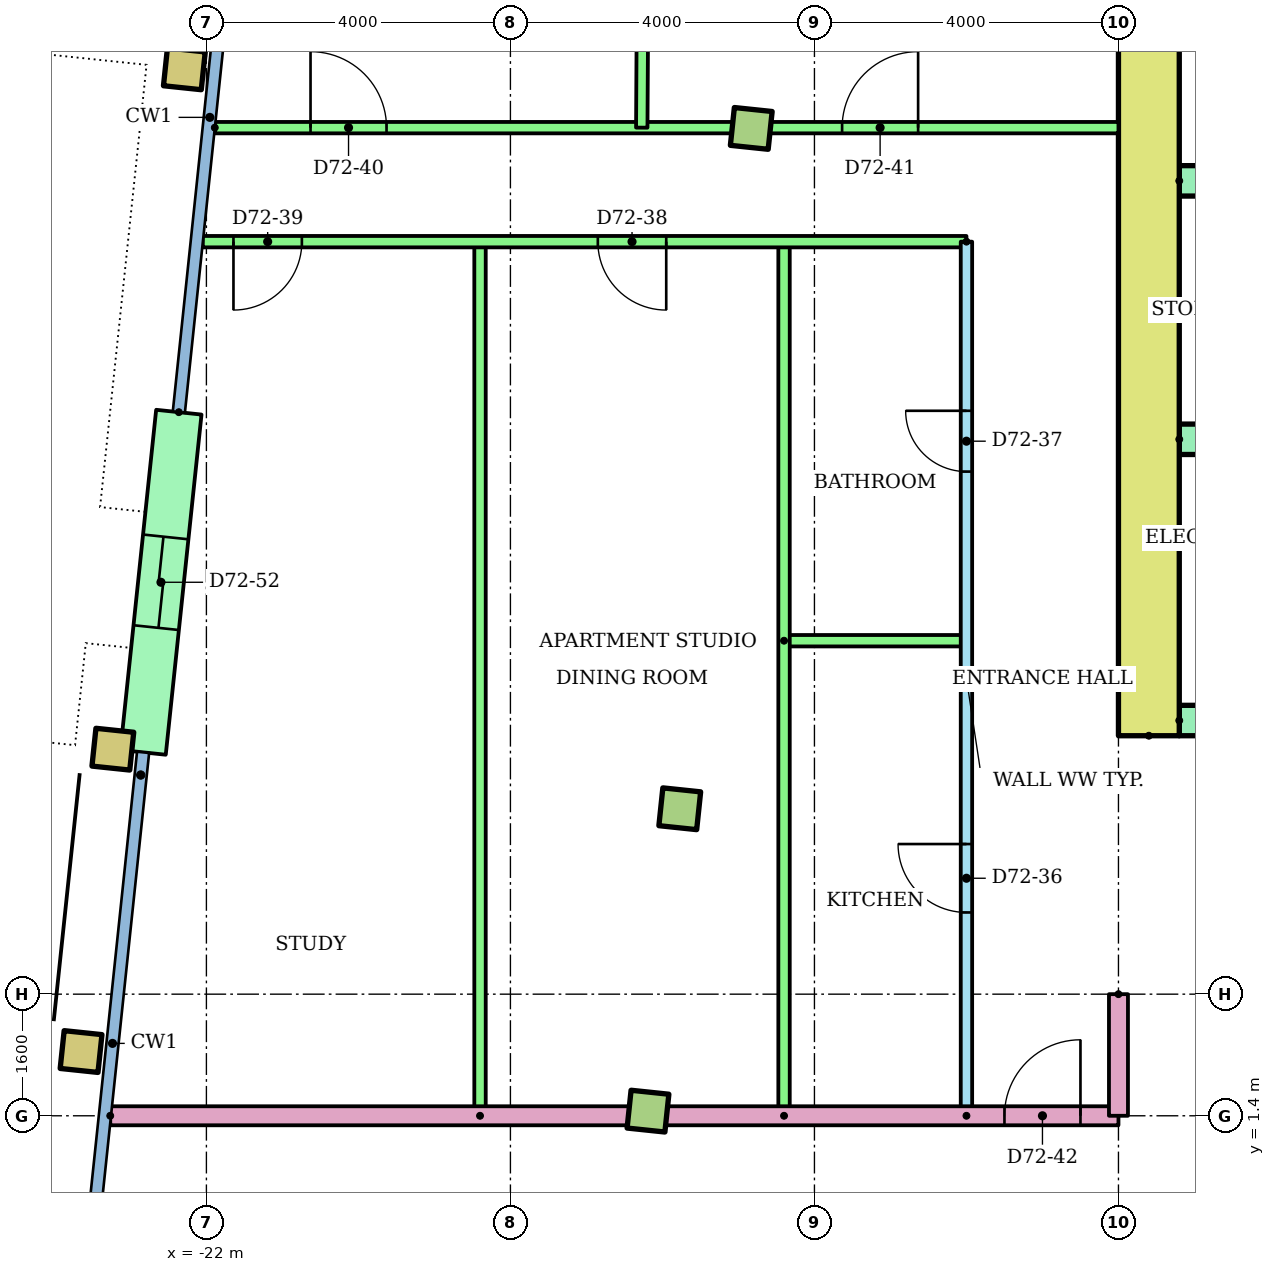
"""IFC4 building model, lengths in metres.
Left out: names, types, materials, properties, quantities, classifications, styles, units other than length and angle.
Written with IfcOpenShell. Run it as: python <this file> out.ifc"""

import sys

from ifc_helpers import new_model, si_unit, direction, frame, frame_2d, origin, origin_2d, place, context, subcontext, project, spatial, rectangle, hollow_rectangle, extrude, element, fill, save


model = new_model("IFC4")
c1 = context("Model", 3, precision=1e-05, world=origin(), true_north=direction((0.0, 1.0)))
c2 = subcontext(c1, "Body", "Model", "MODEL_VIEW")
j1 = project(units=[si_unit("LENGTHUNIT", "METRE"), si_unit("PLANEANGLEUNIT", "RADIAN")], contexts=[c1])
p1 = place(None, origin())
s1 = spatial("IfcSite", under=j1, at=p1, CompositionType="ELEMENT")
p2 = place(p1, origin())
s2 = spatial("IfcBuilding", under=s1, at=p2, CompositionType="ELEMENT")
p3 = place(p2, frame((0.0, 0.0, 275.5)))
s3 = spatial("IfcBuildingStorey", under=s2, at=p3, CompositionType="ELEMENT", Elevation=275.5)
p4 = place(p3, frame((-23.649, 2.245, 0.0), z_axis=(0.0, 0.0, 1.0), x_axis=(0.994521895368, -0.104528463268, 0.0)))
e1 = element("IfcColumn", 1, at=p4, inside=s3, PredefinedType="COLUMN", context=c2, shape_type="SweptSolid", body=[
    extrude(hollow_rectangle(XDim=0.5, YDim=0.5, WallThickness=0.025, at=origin_2d()), origin(), (0.0, 0.0, 1.0), 3.2),
])
p5 = place(p3, frame((-16.19, 1.461, 0.0), z_axis=(0.0, 0.0, 1.0), x_axis=(0.994521895368, -0.104528463268, 0.0)))
e2 = element("IfcColumn", 2, at=p5, inside=s3, PredefinedType="COLUMN", context=c2, shape_type="SweptSolid", body=[
    extrude(rectangle(XDim=0.5, YDim=0.5, at=origin_2d()), origin(), (0.0, 0.0, 1.0), 3.2),
])
p6 = place(p3, frame((-23.231, 6.223, 0.0), z_axis=(0.0, 0.0, 1.0), x_axis=(0.994521895368, -0.104528463268, 0.0)))
e3 = element("IfcColumn", 3, at=p6, inside=s3, PredefinedType="COLUMN", context=c2, shape_type="SweptSolid", body=[
    extrude(hollow_rectangle(XDim=0.5, YDim=0.5, WallThickness=0.025, at=origin_2d()), origin(), (0.0, 0.0, 1.0), 3.2),
])
p7 = place(p3, frame((-15.772, 5.439, 0.0), z_axis=(0.0, 0.0, 1.0), x_axis=(0.994521895368, -0.104528463268, 0.0)))
e4 = element("IfcColumn", 4, at=p7, inside=s3, PredefinedType="COLUMN", context=c2, shape_type="SweptSolid", body=[
    extrude(rectangle(XDim=0.5, YDim=0.5, at=origin_2d()), origin(), (0.0, 0.0, 1.0), 3.2),
])
p8 = place(p3, frame((-22.29, 15.174, 0.0), z_axis=(0.0, 0.0, 1.0), x_axis=(0.994521895368, -0.104528463268, 0.0)))
e5 = element("IfcColumn", 5, at=p8, inside=s3, PredefinedType="COLUMN", context=c2, shape_type="SweptSolid", body=[
    extrude(hollow_rectangle(XDim=0.5, YDim=0.5, WallThickness=0.025, at=origin_2d()), origin(), (0.0, 0.0, 1.0), 3.2),
])
p9 = place(p3, frame((-14.831, 14.39, 0.0), z_axis=(0.0, 0.0, 1.0), x_axis=(0.994521895368, -0.104528463268, 0.0)))
e6 = element("IfcColumn", 6, at=p9, inside=s3, PredefinedType="COLUMN", context=c2, shape_type="SweptSolid", body=[
    extrude(rectangle(XDim=0.5, YDim=0.5, at=origin_2d()), origin(), (0.0, 0.0, 1.0), 3.2),
])
p10 = place(p3, frame((-22.363, 10.657, 0.0), z_axis=(0.0, 0.0, 1.0), x_axis=(-0.104492739125, -0.994525649478, 0.0)))
e7 = element("IfcWall", 7, at=p10, inside=s3, PredefinedType="STANDARD", context=c2, shape_type="SweptSolid", body=[
    extrude(rectangle(XDim=4.5, YDim=0.6, at=frame_2d((2.25, 0.0))), origin(), (0.0, 0.0, 1.0), 2.92),
])
p11 = place(p10, frame((1.65, 0.0, 0.0)))
e8 = element("IfcOpeningElement", 8, at=p11, cuts=e7, PredefinedType="OPENING", context=c2, shape_type="SweptSolid", body=[
    extrude(rectangle(XDim=1.2, YDim=2.1, at=frame_2d((0.6, 1.05))), frame((0.0, 0.31, 0.0), z_axis=(0.0, -1.0, 0.0), x_axis=(1.0, 0.0, 0.0)), (0.0, 0.0, 1.0), 0.62),
])
p12 = place(p3, frame((-9.6, 6.4, 0.0), z_axis=(0.0, 0.0, 1.0), x_axis=(0.0, 1.0, 0.0)))
e9 = element("IfcWall", 9, at=p12, inside=s3, PredefinedType="SHEAR", context=c2, shape_type="SweptSolid", body=[
    extrude(rectangle(XDim=13.6, YDim=0.8, at=frame_2d((6.8, 0.0))), origin(), (0.0, 0.0, 1.0), 2.92),
])
p13 = place(p3, frame((-9.2, 6.6, 0.0)))
e10 = element("IfcWall", 10, at=p13, inside=s3, PredefinedType="SHEAR", context=c2, shape_type="SweptSolid", body=[
    extrude(rectangle(XDim=18.4, YDim=0.4, at=frame_2d((9.2, 0.0))), origin(), (0.0, 0.0, 1.0), 2.92),
])
p14 = place(p13, frame((8.3, 0.0, 0.0)))
e11 = element("IfcOpeningElement", 11, at=p14, cuts=e10, PredefinedType="OPENING", context=c2, shape_type="SweptSolid", body=[
    extrude(rectangle(XDim=1.8, YDim=2.1, at=frame_2d((0.9, 1.05))), frame((0.0, 0.21, 0.0), z_axis=(0.0, -1.0, 0.0), x_axis=(1.0, 0.0, 0.0)), (0.0, 0.0, 1.0), 0.42),
])
p15 = place(p13, frame((3.8, 0.0, 0.0)))
e12 = element("IfcOpeningElement", 12, at=p15, cuts=e10, PredefinedType="OPENING", context=c2, shape_type="SweptSolid", body=[
    extrude(rectangle(XDim=1.8, YDim=2.1, at=frame_2d((0.9, 1.05))), frame((0.0, 0.21, 0.0), z_axis=(0.0, -1.0, 0.0), x_axis=(1.0, 0.0, 0.0)), (0.0, 0.0, 1.0), 0.42),
])
p16 = place(p13, frame((12.8, 0.0, 0.0)))
e13 = element("IfcOpeningElement", 13, at=p16, cuts=e10, PredefinedType="OPENING", context=c2, shape_type="SweptSolid", body=[
    extrude(rectangle(XDim=1.8, YDim=2.1, at=frame_2d((0.9, 1.05))), frame((0.0, 0.21, 0.0), z_axis=(0.0, -1.0, 0.0), x_axis=(1.0, 0.0, 0.0)), (0.0, 0.0, 1.0), 0.42),
])
p17 = place(p3, frame((-9.2, 10.3, 0.0)))
e14 = element("IfcWall", 14, at=p17, inside=s3, PredefinedType="SHEAR", context=c2, shape_type="SweptSolid", body=[
    extrude(rectangle(XDim=8.0, YDim=0.4, at=frame_2d((4.0, 0.0))), origin(), (0.0, 0.0, 1.0), 2.92),
])
p18 = place(p17, frame((3.35, 0.0, 0.0)))
e15 = element("IfcOpeningElement", 15, at=p18, cuts=e14, PredefinedType="OPENING", context=c2, shape_type="SweptSolid", body=[
    extrude(rectangle(XDim=1.1, YDim=2.1, at=frame_2d((0.55, 1.05))), frame((0.0, 0.21, 0.0), z_axis=(0.0, -1.0, 0.0), x_axis=(1.0, 0.0, 0.0)), (0.0, 0.0, 1.0), 0.42),
])
p19 = place(p17, frame((6.083, 0.0, 0.0)))
e16 = element("IfcOpeningElement", 16, at=p19, cuts=e14, PredefinedType="OPENING", context=c2, shape_type="SweptSolid", body=[
    extrude(rectangle(XDim=1.1, YDim=2.1, at=frame_2d((0.55, 1.05))), frame((0.0, 0.21, 0.0), z_axis=(0.0, -1.0, 0.0), x_axis=(1.0, 0.0, 0.0)), (0.0, 0.0, 1.0), 0.42),
])
p20 = place(p17, frame((0.917, 0.0, 0.0)))
e17 = element("IfcOpeningElement", 17, at=p20, cuts=e14, PredefinedType="OPENING", context=c2, shape_type="SweptSolid", body=[
    extrude(rectangle(XDim=1.0, YDim=2.1, at=frame_2d((0.5, 1.05))), frame((0.0, 0.21, 0.0), z_axis=(0.0, -1.0, 0.0), x_axis=(1.0, 0.0, 0.0)), (0.0, 0.0, 1.0), 0.42),
])
p21 = place(p3, frame((-9.2, 13.7, 0.0)))
e18 = element("IfcWall", 18, at=p21, inside=s3, PredefinedType="SHEAR", context=c2, shape_type="SweptSolid", body=[
    extrude(rectangle(XDim=8.0, YDim=0.4, at=frame_2d((4.0, 0.0))), origin(), (0.0, 0.0, 1.0), 2.92),
])
p22 = place(p3, frame((-12.0, 1.4, 0.0), z_axis=(0.0, 0.0, 1.0), x_axis=(0.0, 1.0, 0.0)))
e19 = element("IfcWall", 19, at=p22, inside=s3, PredefinedType="PARTITIONING", context=c2, shape_type="SweptSolid", body=[
    extrude(rectangle(XDim=11.5, YDim=0.15, at=frame_2d((5.75, 0.0))), origin(), (0.0, 0.0, 1.0), 2.4),
])
p23 = place(p22, frame((2.675, 0.0, 0.0)))
e20 = element("IfcOpeningElement", 20, at=p23, cuts=e19, PredefinedType="OPENING", context=c2, shape_type="SweptSolid", body=[
    extrude(rectangle(XDim=0.9, YDim=2.1, at=frame_2d((0.45, 1.05))), frame((0.0, 0.085, 0.0), z_axis=(0.0, -1.0, 0.0), x_axis=(1.0, 0.0, 0.0)), (0.0, 0.0, 1.0), 0.17),
])
p24 = place(p22, frame((8.475, 0.0, 0.0)))
e21 = element("IfcOpeningElement", 21, at=p24, cuts=e19, PredefinedType="OPENING", context=c2, shape_type="SweptSolid", body=[
    extrude(rectangle(XDim=0.8, YDim=2.1, at=frame_2d((0.4, 1.05))), frame((0.0, 0.085, 0.0), z_axis=(0.0, -1.0, 0.0), x_axis=(1.0, 0.0, 0.0)), (0.0, 0.0, 1.0), 0.17),
])
p25 = place(p3, frame((-14.4, 7.65, 0.0)))
e22 = element("IfcWall", 22, at=p25, inside=s3, PredefinedType="PARTITIONING", context=c2, shape_type="SweptSolid", body=[
    extrude(rectangle(XDim=2.4, YDim=0.15, at=frame_2d((1.2, 0.0))), origin(), (0.0, 0.0, 1.0), 2.4),
])
for number, where, z_axis, x_axis in (
    (23, (-14.4, 1.4, 0.0), (0.0, 0.0, 1.0), (0.0, 1.0, 0.0)),
    (24, (-18.4, 1.4, 0.0), (0.0, 0.0, 1.0), (0.0, 1.0, 0.0)),
):
    element("IfcWall", number, at=place(p3, frame(where, z_axis=z_axis, x_axis=x_axis)), inside=s3, PredefinedType="PARTITIONING", context=c2, shape_type="SweptSolid", body=[
        extrude(rectangle(XDim=11.5, YDim=0.15, at=frame_2d((5.75, 0.0))), origin(), (0.0, 0.0, 1.0), 2.4),
    ])
p26 = place(p3, frame((-12.0, 12.9, 0.0), z_axis=(0.0, 0.0, 1.0), x_axis=(-1.0, 0.0, 0.0)))
e25 = element("IfcWall", 25, at=p26, inside=s3, PredefinedType="PARTITIONING", context=c2, shape_type="SweptSolid", body=[
    extrude(rectangle(XDim=10.047, YDim=0.15, at=frame_2d((5.024, 0.0))), origin(), (0.0, 0.0, 1.0), 2.4),
])
p27 = place(p26, frame((3.95, 0.0, 0.0)))
e26 = element("IfcOpeningElement", 26, at=p27, cuts=e25, PredefinedType="OPENING", context=c2, shape_type="SweptSolid", body=[
    extrude(rectangle(XDim=0.9, YDim=2.1, at=frame_2d((0.45, 1.05))), frame((0.0, 0.085, 0.0), z_axis=(0.0, -1.0, 0.0), x_axis=(1.0, 0.0, 0.0)), (0.0, 0.0, 1.0), 0.17),
])
p28 = place(p26, frame((8.744, 0.0, 0.0)))
e27 = element("IfcOpeningElement", 27, at=p28, cuts=e25, PredefinedType="OPENING", context=c2, shape_type="SweptSolid", body=[
    extrude(rectangle(XDim=0.9, YDim=2.1, at=frame_2d((0.45, 1.05))), frame((0.0, 0.085, 0.0), z_axis=(0.0, -1.0, 0.0), x_axis=(1.0, 0.0, 0.0)), (0.0, 0.0, 1.0), 0.17),
])
p29 = place(p3, frame((-21.89, 14.4, 0.0)))
e28 = element("IfcWall", 28, at=p29, inside=s3, PredefinedType="PARTITIONING", context=c2, shape_type="SweptSolid", body=[
    extrude(rectangle(XDim=11.89, YDim=0.15, at=frame_2d((5.945, 0.0))), origin(), (0.0, 0.0, 1.0), 2.4),
])
p30 = place(p29, frame((1.26, 0.0, 0.0)))
e29 = element("IfcOpeningElement", 29, at=p30, cuts=e28, PredefinedType="OPENING", context=c2, shape_type="SweptSolid", body=[
    extrude(rectangle(XDim=1.0, YDim=2.1, at=frame_2d((0.5, 1.05))), frame((0.0, 0.085, 0.0), z_axis=(0.0, -1.0, 0.0), x_axis=(1.0, 0.0, 0.0)), (0.0, 0.0, 1.0), 0.17),
])
p31 = place(p29, frame((8.254, 0.0, 0.0)))
e30 = element("IfcOpeningElement", 30, at=p31, cuts=e28, PredefinedType="OPENING", context=c2, shape_type="SweptSolid", body=[
    extrude(rectangle(XDim=1.0, YDim=2.1, at=frame_2d((0.5, 1.05))), frame((0.0, 0.085, 0.0), z_axis=(0.0, -1.0, 0.0), x_axis=(1.0, 0.0, 0.0)), (0.0, 0.0, 1.0), 0.17),
])
p32 = place(p3, frame((-16.222, 22.61, 0.0), z_axis=(0.0, 0.0, 1.0), x_axis=(-0.006095634594, -0.999981421447, 0.0)))
e31 = element("IfcWall", 31, at=p32, inside=s3, PredefinedType="PARTITIONING", context=c2, shape_type="SweptSolid", body=[
    extrude(rectangle(XDim=8.211, YDim=0.15, at=frame_2d((4.105, 0.0))), origin(), (0.0, 0.0, 1.0), 2.4),
])
p33 = place(p3, frame((-23.265, 1.4, 0.0)))
e32 = element("IfcWall", 32, at=p33, inside=s3, PredefinedType="PARTITIONING", context=c2, shape_type="SweptSolid", body=[
    extrude(rectangle(XDim=13.265, YDim=0.25, at=frame_2d((6.633, 0.0))), origin(), (0.0, 0.0, 1.0), 2.4),
])
p34 = place(p33, frame((11.765, 0.0, 0.0)))
e33 = element("IfcOpeningElement", 33, at=p34, cuts=e32, PredefinedType="OPENING", context=c2, shape_type="SweptSolid", body=[
    extrude(rectangle(XDim=1.0, YDim=2.1, at=frame_2d((0.5, 1.05))), frame((0.0, 0.135, 0.0), z_axis=(0.0, -1.0, 0.0), x_axis=(1.0, 0.0, 0.0)), (0.0, 0.0, 1.0), 0.27),
])
p35 = place(p3, frame((-10.0, 3.0, 0.0), z_axis=(0.0, 0.0, 1.0), x_axis=(0.0, -1.0, 0.0)))
e34 = element("IfcWall", 34, at=p35, inside=s3, PredefinedType="PARTITIONING", context=c2, shape_type="SweptSolid", body=[
    extrude(rectangle(XDim=1.6, YDim=0.25, at=frame_2d((0.8, 0.0))), origin(), (0.0, 0.0, 1.0), 2.4),
])
p36 = place(p23, origin())
e35 = element("IfcDoor", 35, at=p36, inside=s3, OperationType="SINGLE_SWING_RIGHT", PredefinedType="DOOR", context=c2, shape_type="SweptSolid", body=[
    extrude(rectangle(XDim=0.9, YDim=2.1, at=frame_2d((0.45, 1.05))), frame((0.0, 0.025, 0.0), z_axis=(0.0, -1.0, 0.0), x_axis=(1.0, 0.0, 0.0)), (0.0, 0.0, 1.0), 0.05),
])
fill(e20, e35)
p37 = place(p24, origin())
e36 = element("IfcDoor", 36, at=p37, inside=s3, OperationType="SINGLE_SWING_RIGHT", PredefinedType="DOOR", context=c2, shape_type="SweptSolid", body=[
    extrude(rectangle(XDim=0.8, YDim=2.1, at=frame_2d((0.4, 1.05))), frame((0.0, 0.025, 0.0), z_axis=(0.0, -1.0, 0.0), x_axis=(1.0, 0.0, 0.0)), (0.0, 0.0, 1.0), 0.05),
])
fill(e21, e36)
p38 = place(p27, origin())
e37 = element("IfcDoor", 37, at=p38, inside=s3, OperationType="SINGLE_SWING_LEFT", PredefinedType="DOOR", context=c2, shape_type="SweptSolid", body=[
    extrude(rectangle(XDim=0.9, YDim=2.1, at=frame_2d((0.45, 1.05))), frame((0.0, 0.025, 0.0), z_axis=(0.0, -1.0, 0.0), x_axis=(1.0, 0.0, 0.0)), (0.0, 0.0, 1.0), 0.05),
])
fill(e26, e37)
p39 = place(p28, origin())
e38 = element("IfcDoor", 38, at=p39, inside=s3, OperationType="SINGLE_SWING_RIGHT", PredefinedType="DOOR", context=c2, shape_type="SweptSolid", body=[
    extrude(rectangle(XDim=0.9, YDim=2.1, at=frame_2d((0.45, 1.05))), frame((0.0, 0.025, 0.0), z_axis=(0.0, -1.0, 0.0), x_axis=(1.0, 0.0, 0.0)), (0.0, 0.0, 1.0), 0.05),
])
fill(e27, e38)
p40 = place(p30, origin())
e39 = element("IfcDoor", 39, at=p40, inside=s3, OperationType="SINGLE_SWING_LEFT", PredefinedType="DOOR", context=c2, shape_type="SweptSolid", body=[
    extrude(rectangle(XDim=1.0, YDim=2.1, at=frame_2d((0.5, 1.05))), frame((0.0, 0.025, 0.0), z_axis=(0.0, -1.0, 0.0), x_axis=(1.0, 0.0, 0.0)), (0.0, 0.0, 1.0), 0.05),
])
fill(e29, e39)
p41 = place(p31, origin())
e40 = element("IfcDoor", 40, at=p41, inside=s3, OperationType="SINGLE_SWING_RIGHT", PredefinedType="DOOR", context=c2, shape_type="SweptSolid", body=[
    extrude(rectangle(XDim=1.0, YDim=2.1, at=frame_2d((0.5, 1.05))), frame((0.0, 0.025, 0.0), z_axis=(0.0, -1.0, 0.0), x_axis=(1.0, 0.0, 0.0)), (0.0, 0.0, 1.0), 0.05),
])
fill(e30, e40)
p42 = place(p34, origin())
e41 = element("IfcDoor", 41, at=p42, inside=s3, OperationType="SINGLE_SWING_RIGHT", PredefinedType="DOOR", context=c2, shape_type="SweptSolid", body=[
    extrude(rectangle(XDim=1.0, YDim=2.1, at=frame_2d((0.5, 1.05))), frame((0.0, 0.025, 0.0), z_axis=(0.0, -1.0, 0.0), x_axis=(1.0, 0.0, 0.0)), (0.0, 0.0, 1.0), 0.05),
])
fill(e33, e41)
p43 = place(p11, origin())
e42 = element("IfcDoor", 42, at=p43, inside=s3, OperationType="SLIDING_TO_LEFT", PredefinedType="DOOR", context=c2, shape_type="SweptSolid", body=[
    extrude(rectangle(XDim=1.2, YDim=2.1, at=frame_2d((0.6, 1.05))), frame((0.0, 0.025, 0.0), z_axis=(0.0, -1.0, 0.0), x_axis=(1.0, 0.0, 0.0)), (0.0, 0.0, 1.0), 0.05),
])
fill(e8, e42)
save(model, sys.argv[1])
